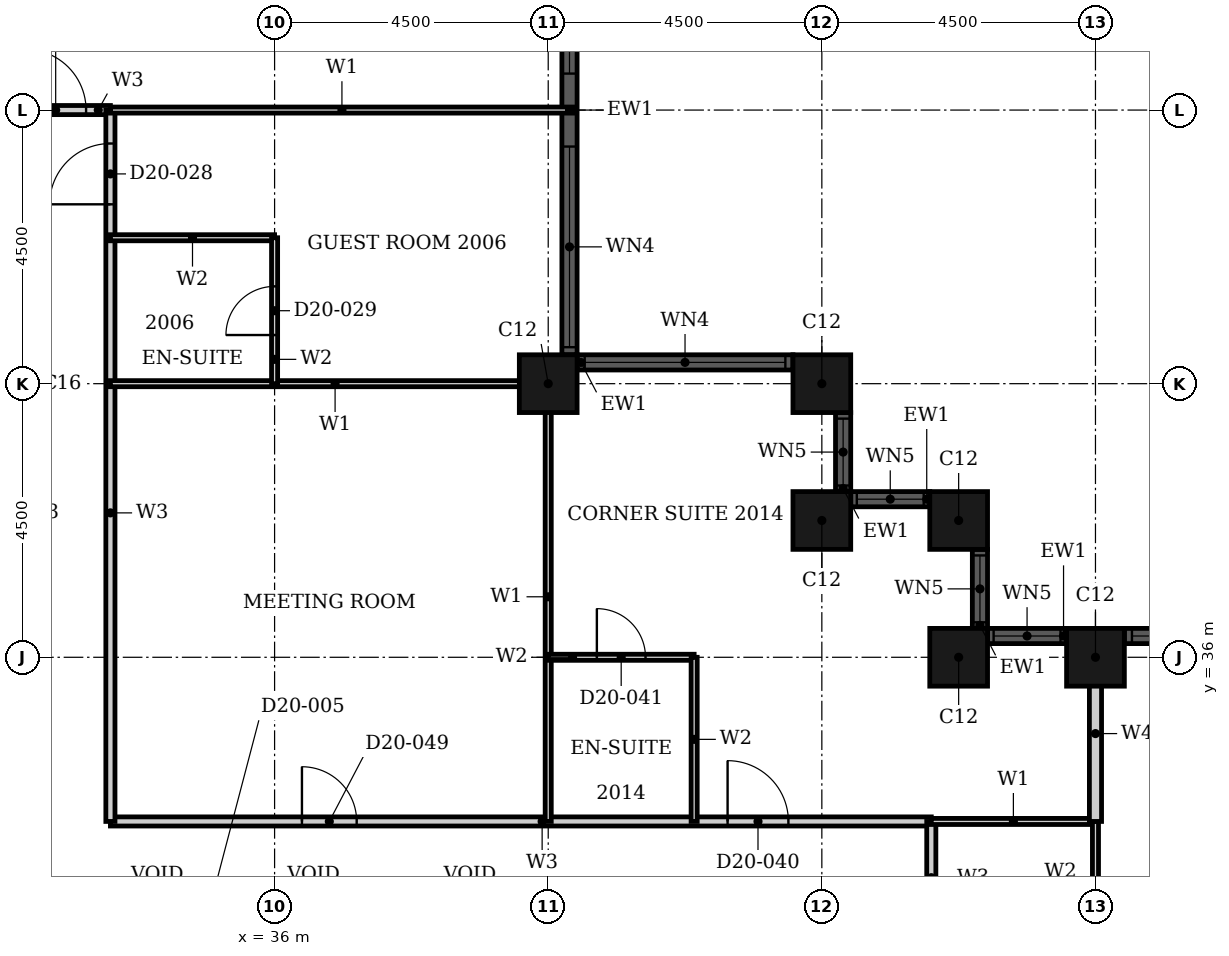
"""IFC4 building model, lengths in metres.
Left out: names, types, materials, properties, quantities, classifications, styles, units other than length and angle.
Written with IfcOpenShell. Run it as: python <this file> out.ifc"""

import sys

from ifc_helpers import new_model, si_unit, direction, frame, frame_2d, origin, origin_2d, place, context, subcontext, project, spatial, rectangle, hollow_rectangle, extrude, element, fill, save


model = new_model("IFC4")
c1 = context("Model", 3, precision=1e-05, world=origin(), true_north=direction((0.0, 1.0)))
c2 = subcontext(c1, "Body", "Model", "MODEL_VIEW")
j1 = project(units=[si_unit("LENGTHUNIT", "METRE"), si_unit("PLANEANGLEUNIT", "RADIAN")], contexts=[c1])
p1 = place(None, origin())
s1 = spatial("IfcSite", under=j1, at=p1, CompositionType="ELEMENT")
p2 = place(p1, origin())
s2 = spatial("IfcBuilding", under=s1, at=p2, CompositionType="ELEMENT")
p3 = place(p2, frame((0.0, 0.0, 85.2)))
s3 = spatial("IfcBuildingStorey", under=s2, at=p3, CompositionType="ELEMENT", Elevation=85.2)
for number, where, z_axis, x_axis in (
    (1, (49.5, 36.0, 0.0), (0.0, 0.0, 1.0), (1.0, 0.0, 0.0)),
    (2, (47.25, 36.0, 0.0), (0.0, 0.0, 1.0), (1.0, 0.0, 0.0)),
    (3, (47.25, 38.25, 0.0), (0.0, 0.0, 1.0), (1.0, 0.0, 0.0)),
    (4, (45.0, 38.25, 0.0), (0.0, 0.0, 1.0), (1.0, 0.0, 0.0)),
    (5, (45.0, 40.5, 0.0), (0.0, 0.0, 1.0), (1.0, 0.0, 0.0)),
    (6, (40.5, 40.5, 0.0), (0.0, 0.0, 1.0), (1.0, 0.0, 0.0)),
):
    element("IfcColumn", number, at=place(p3, frame(where, z_axis=z_axis, x_axis=x_axis)), inside=s3, PredefinedType="COLUMN", context=c2, shape_type="SweptSolid", body=[
        extrude(hollow_rectangle(XDim=0.95, YDim=0.95, WallThickness=0.03, at=origin_2d()), origin(), (0.0, 0.0, 1.0), 3.6),
    ])
p4 = place(p3, frame((58.025, 36.35, 0.0), z_axis=(0.0, 0.0, 1.0), x_axis=(-1.0, 0.0, 0.0)))
e7 = element("IfcWall", 7, at=p4, inside=s3, PredefinedType="SOLIDWALL", context=c2, shape_type="SweptSolid", body=[
    extrude(rectangle(XDim=8.05, YDim=0.25, at=frame_2d((4.025, 0.0))), origin(), (0.0, 0.0, 1.0), 3.6),
])
p5 = place(p4, frame((0.125, 0.0, 0.9)))
e8 = element("IfcOpeningElement", 8, at=p5, cuts=e7, PredefinedType="OPENING", context=c2, shape_type="SweptSolid", body=[
    extrude(rectangle(XDim=3.3, YDim=2.08, at=frame_2d((1.65, 1.04))), frame((0.0, 0.135, 0.0), z_axis=(0.0, -1.0, 0.0), x_axis=(1.0, 0.0, 0.0)), (0.0, 0.0, 1.0), 0.27),
])
p6 = place(p4, frame((4.625, 0.0, 0.9)))
e9 = element("IfcOpeningElement", 9, at=p6, cuts=e7, PredefinedType="OPENING", context=c2, shape_type="SweptSolid", body=[
    extrude(rectangle(XDim=3.3, YDim=2.08, at=frame_2d((1.65, 1.04))), frame((0.0, 0.135, 0.0), z_axis=(0.0, -1.0, 0.0), x_axis=(1.0, 0.0, 0.0)), (0.0, 0.0, 1.0), 0.27),
])
p7 = place(p3, frame((49.025, 36.35, 0.0), z_axis=(0.0, 0.0, 1.0), x_axis=(-1.0, 0.0, 0.0)))
e10 = element("IfcWall", 10, at=p7, inside=s3, PredefinedType="SOLIDWALL", context=c2, shape_type="SweptSolid", body=[
    extrude(rectangle(XDim=1.3, YDim=0.25, at=frame_2d((0.65, 0.0))), origin(), (0.0, 0.0, 1.0), 3.6),
])
p8 = place(p7, frame((0.1, 0.0, 0.9)))
e11 = element("IfcOpeningElement", 11, at=p8, cuts=e10, PredefinedType="OPENING", context=c2, shape_type="SweptSolid", body=[
    extrude(rectangle(XDim=1.1, YDim=2.08, at=frame_2d((0.55, 1.04))), frame((0.0, 0.135, 0.0), z_axis=(0.0, -1.0, 0.0), x_axis=(1.0, 0.0, 0.0)), (0.0, 0.0, 1.0), 0.27),
])
p9 = place(p3, frame((47.6, 36.475, 0.0), z_axis=(0.0, 0.0, 1.0), x_axis=(0.0, 1.0, 0.0)))
e12 = element("IfcWall", 12, at=p9, inside=s3, PredefinedType="SOLIDWALL", context=c2, shape_type="SweptSolid", body=[
    extrude(rectangle(XDim=1.3, YDim=0.25, at=frame_2d((0.65, 0.0))), origin(), (0.0, 0.0, 1.0), 3.6),
])
p10 = place(p9, frame((0.1, 0.0, 0.9)))
e13 = element("IfcOpeningElement", 13, at=p10, cuts=e12, PredefinedType="OPENING", context=c2, shape_type="SweptSolid", body=[
    extrude(rectangle(XDim=1.1, YDim=2.08, at=frame_2d((0.55, 1.04))), frame((0.0, 0.135, 0.0), z_axis=(0.0, -1.0, 0.0), x_axis=(1.0, 0.0, 0.0)), (0.0, 0.0, 1.0), 0.27),
])
p11 = place(p3, frame((46.775, 38.6, 0.0), z_axis=(0.0, 0.0, 1.0), x_axis=(-1.0, 0.0, 0.0)))
e14 = element("IfcWall", 14, at=p11, inside=s3, PredefinedType="SOLIDWALL", context=c2, shape_type="SweptSolid", body=[
    extrude(rectangle(XDim=1.3, YDim=0.25, at=frame_2d((0.65, 0.0))), origin(), (0.0, 0.0, 1.0), 3.6),
])
p12 = place(p11, frame((0.1, 0.0, 0.9)))
e15 = element("IfcOpeningElement", 15, at=p12, cuts=e14, PredefinedType="OPENING", context=c2, shape_type="SweptSolid", body=[
    extrude(rectangle(XDim=1.1, YDim=2.08, at=frame_2d((0.55, 1.04))), frame((0.0, 0.135, 0.0), z_axis=(0.0, -1.0, 0.0), x_axis=(1.0, 0.0, 0.0)), (0.0, 0.0, 1.0), 0.27),
])
p13 = place(p3, frame((45.35, 38.725, 0.0), z_axis=(0.0, 0.0, 1.0), x_axis=(0.0, 1.0, 0.0)))
e16 = element("IfcWall", 16, at=p13, inside=s3, PredefinedType="SOLIDWALL", context=c2, shape_type="SweptSolid", body=[
    extrude(rectangle(XDim=1.3, YDim=0.25, at=frame_2d((0.65, 0.0))), origin(), (0.0, 0.0, 1.0), 3.6),
])
p14 = place(p13, frame((0.1, 0.0, 0.9)))
e17 = element("IfcOpeningElement", 17, at=p14, cuts=e16, PredefinedType="OPENING", context=c2, shape_type="SweptSolid", body=[
    extrude(rectangle(XDim=1.1, YDim=2.08, at=frame_2d((0.55, 1.04))), frame((0.0, 0.135, 0.0), z_axis=(0.0, -1.0, 0.0), x_axis=(1.0, 0.0, 0.0)), (0.0, 0.0, 1.0), 0.27),
])
p15 = place(p3, frame((44.525, 40.85, 0.0), z_axis=(0.0, 0.0, 1.0), x_axis=(-1.0, 0.0, 0.0)))
e18 = element("IfcWall", 18, at=p15, inside=s3, PredefinedType="SOLIDWALL", context=c2, shape_type="SweptSolid", body=[
    extrude(rectangle(XDim=3.55, YDim=0.25, at=frame_2d((1.775, 0.0))), origin(), (0.0, 0.0, 1.0), 3.6),
])
p16 = place(p15, frame((0.125, 0.0, 0.9)))
e19 = element("IfcOpeningElement", 19, at=p16, cuts=e18, PredefinedType="OPENING", context=c2, shape_type="SweptSolid", body=[
    extrude(rectangle(XDim=3.3, YDim=2.08, at=frame_2d((1.65, 1.04))), frame((0.0, 0.135, 0.0), z_axis=(0.0, -1.0, 0.0), x_axis=(1.0, 0.0, 0.0)), (0.0, 0.0, 1.0), 0.27),
])
p17 = place(p3, frame((40.85, 40.975, 0.0), z_axis=(0.0, 0.0, 1.0), x_axis=(0.0, 1.0, 0.0)))
e20 = element("IfcWall", 20, at=p17, inside=s3, PredefinedType="SOLIDWALL", context=c2, shape_type="SweptSolid", body=[
    extrude(rectangle(XDim=8.05, YDim=0.25, at=frame_2d((4.025, 0.0))), origin(), (0.0, 0.0, 1.0), 3.6),
])
p18 = place(p17, frame((0.125, 0.0, 0.9)))
e21 = element("IfcOpeningElement", 21, at=p18, cuts=e20, PredefinedType="OPENING", context=c2, shape_type="SweptSolid", body=[
    extrude(rectangle(XDim=3.3, YDim=2.08, at=frame_2d((1.65, 1.04))), frame((0.0, 0.135, 0.0), z_axis=(0.0, -1.0, 0.0), x_axis=(1.0, 0.0, 0.0)), (0.0, 0.0, 1.0), 0.27),
])
p19 = place(p17, frame((4.625, 0.0, 0.9)))
e22 = element("IfcOpeningElement", 22, at=p19, cuts=e20, PredefinedType="OPENING", context=c2, shape_type="SweptSolid", body=[
    extrude(rectangle(XDim=3.3, YDim=2.08, at=frame_2d((1.65, 1.04))), frame((0.0, 0.135, 0.0), z_axis=(0.0, -1.0, 0.0), x_axis=(1.0, 0.0, 0.0)), (0.0, 0.0, 1.0), 0.27),
])
p20 = place(p3, frame((33.3, 33.3, 0.0), z_axis=(0.0, 0.0, 1.0), x_axis=(1.0, 0.0, 0.0)))
e23 = element("IfcWall", 23, at=p20, inside=s3, PredefinedType="PARTITIONING", context=c2, shape_type="SweptSolid", body=[
    extrude(rectangle(XDim=13.5, YDim=0.15, at=frame_2d((6.75, 0.0))), origin(), (0.0, 0.0, 1.0), 3.3),
])
p21 = place(p20, frame((10.15, 0.0, 0.0)))
e24 = element("IfcOpeningElement", 24, at=p21, cuts=e23, PredefinedType="OPENING", context=c2, shape_type="SweptSolid", body=[
    extrude(rectangle(XDim=1.0, YDim=2.1, at=frame_2d((0.5, 1.05))), frame((0.0, 0.085, 0.0), z_axis=(0.0, -1.0, 0.0), x_axis=(1.0, 0.0, 0.0)), (0.0, 0.0, 1.0), 0.17),
])
p22 = place(p20, frame((3.15, 0.0, 0.0)))
e25 = element("IfcOpeningElement", 25, at=p22, cuts=e23, PredefinedType="OPENING", context=c2, shape_type="SweptSolid", body=[
    extrude(rectangle(XDim=0.9, YDim=2.1, at=frame_2d((0.45, 1.05))), frame((0.0, 0.085, 0.0), z_axis=(0.0, -1.0, 0.0), x_axis=(1.0, 0.0, 0.0)), (0.0, 0.0, 1.0), 0.17),
])
p23 = place(p3, frame((31.5, 45.0, 0.0), z_axis=(0.0, 0.0, 1.0), x_axis=(1.0, 0.0, 0.0)))
e26 = element("IfcWall", 26, at=p23, inside=s3, PredefinedType="PARTITIONING", context=c2, shape_type="SweptSolid", body=[
    extrude(rectangle(XDim=1.8, YDim=0.15, at=frame_2d((0.9, 0.0))), origin(), (0.0, 0.0, 1.0), 3.3),
])
p24 = place(p23, frame((0.4, 0.0, 0.0)))
e27 = element("IfcOpeningElement", 27, at=p24, cuts=e26, PredefinedType="OPENING", context=c2, shape_type="SweptSolid", body=[
    extrude(rectangle(XDim=1.0, YDim=2.1, at=frame_2d((0.5, 1.05))), frame((0.0, 0.085, 0.0), z_axis=(0.0, -1.0, 0.0), x_axis=(1.0, 0.0, 0.0)), (0.0, 0.0, 1.0), 0.17),
])
p25 = place(p3, frame((33.3, 33.3, 0.0), z_axis=(0.0, 0.0, 1.0), x_axis=(0.0, 1.0, 0.0)))
e28 = element("IfcWall", 28, at=p25, inside=s3, PredefinedType="PARTITIONING", context=c2, shape_type="SweptSolid", body=[
    extrude(rectangle(XDim=11.7, YDim=0.15, at=frame_2d((5.85, 0.0))), origin(), (0.0, 0.0, 1.0), 3.3),
])
p26 = place(p25, frame((10.15, 0.0, 0.0)))
e29 = element("IfcOpeningElement", 29, at=p26, cuts=e28, PredefinedType="OPENING", context=c2, shape_type="SweptSolid", body=[
    extrude(rectangle(XDim=1.0, YDim=2.1, at=frame_2d((0.5, 1.05))), frame((0.0, 0.085, 0.0), z_axis=(0.0, -1.0, 0.0), x_axis=(1.0, 0.0, 0.0)), (0.0, 0.0, 1.0), 0.17),
])
p27 = place(p3, frame((46.8, 28.8, 0.0), z_axis=(0.0, 0.0, 1.0), x_axis=(0.0, 1.0, 0.0)))
e30 = element("IfcWall", 30, at=p27, inside=s3, PredefinedType="PARTITIONING", context=c2, shape_type="SweptSolid", body=[
    extrude(rectangle(XDim=4.5, YDim=0.15, at=frame_2d((2.25, 0.0))), origin(), (0.0, 0.0, 1.0), 3.3),
])
p28 = place(p27, frame((1.75, 0.0, 0.0)))
e31 = element("IfcOpeningElement", 31, at=p28, cuts=e30, PredefinedType="OPENING", context=c2, shape_type="SweptSolid", body=[
    extrude(rectangle(XDim=0.9, YDim=2.1, at=frame_2d((0.45, 1.05))), frame((0.0, 0.085, 0.0), z_axis=(0.0, -1.0, 0.0), x_axis=(1.0, 0.0, 0.0)), (0.0, 0.0, 1.0), 0.17),
])
p29 = place(p3, frame((46.8, 33.3, 0.0), z_axis=(0.0, 0.0, 1.0), x_axis=(1.0, 0.0, 0.0)))
e32 = element("IfcWall", 32, at=p29, inside=s3, PredefinedType="PARTITIONING", context=c2, shape_type="SweptSolid", body=[
    extrude(rectangle(XDim=2.7, YDim=0.1, at=frame_2d((1.35, 0.0))), origin(), (0.0, 0.0, 1.0), 3.3),
])
p30 = place(p3, frame((33.3, 40.5, 0.0), z_axis=(0.0, 0.0, 1.0), x_axis=(1.0, 0.0, 0.0)))
e33 = element("IfcWall", 33, at=p30, inside=s3, PredefinedType="PARTITIONING", context=c2, shape_type="SweptSolid", body=[
    extrude(rectangle(XDim=7.39, YDim=0.1, at=frame_2d((3.695, 0.0))), origin(), (0.0, 0.0, 1.0), 2.38),
])
p31 = place(p3, frame((33.3, 45.0, 0.0), z_axis=(0.0, 0.0, 1.0), x_axis=(1.0, 0.0, 0.0)))
e34 = element("IfcWall", 34, at=p31, inside=s3, PredefinedType="PARTITIONING", context=c2, shape_type="SweptSolid", body=[
    extrude(rectangle(XDim=7.615, YDim=0.1, at=frame_2d((3.808, 0.0))), origin(), (0.0, 0.0, 1.0), 3.3),
])
p32 = place(p3, frame((40.5, 33.3, 0.0), z_axis=(0.0, 0.0, 1.0), x_axis=(0.0, 1.0, 0.0)))
e35 = element("IfcWall", 35, at=p32, inside=s3, PredefinedType="PARTITIONING", context=c2, shape_type="SweptSolid", body=[
    extrude(rectangle(XDim=7.39, YDim=0.1, at=frame_2d((3.695, 0.0))), origin(), (0.0, 0.0, 1.0), 3.3),
])
p33 = place(p3, frame((49.5, 28.8, 0.0), z_axis=(0.0, 0.0, 1.0), x_axis=(0.0, 1.0, 0.0)))
e36 = element("IfcWall", 36, at=p33, inside=s3, PredefinedType="PARTITIONING", context=c2, shape_type="SweptSolid", body=[
    extrude(rectangle(XDim=4.5, YDim=0.1, at=frame_2d((2.25, 0.0))), origin(), (0.0, 0.0, 1.0), 2.38),
])
p34 = place(p3, frame((49.5, 33.3, 0.0), z_axis=(0.0, 0.0, 1.0), x_axis=(0.0, 1.0, 0.0)))
e37 = element("IfcWall", 37, at=p34, inside=s3, PredefinedType="PARTITIONING", context=c2, shape_type="SweptSolid", body=[
    extrude(rectangle(XDim=2.89, YDim=0.2, at=frame_2d((1.445, 0.0))), origin(), (0.0, 0.0, 1.0), 2.38),
])
p35 = place(p3, frame((40.5, 36.0, 0.0), z_axis=(0.0, 0.0, 1.0), x_axis=(1.0, 0.0, 0.0)))
e38 = element("IfcWall", 38, at=p35, inside=s3, PredefinedType="PARTITIONING", context=c2, shape_type="SweptSolid", body=[
    extrude(rectangle(XDim=2.4, YDim=0.1, at=frame_2d((1.2, 0.0))), origin(), (0.0, 0.0, 1.0), 3.3),
])
p36 = place(p35, frame((0.8, 0.0, 0.0)))
e39 = element("IfcOpeningElement", 39, at=p36, cuts=e38, PredefinedType="OPENING", context=c2, shape_type="SweptSolid", body=[
    extrude(rectangle(XDim=0.8, YDim=2.1, at=frame_2d((0.4, 1.05))), frame((0.0, 0.06, 0.0), z_axis=(0.0, -1.0, 0.0), x_axis=(1.0, 0.0, 0.0)), (0.0, 0.0, 1.0), 0.12),
])
p37 = place(p3, frame((33.3, 42.9, 0.0), z_axis=(0.0, 0.0, 1.0), x_axis=(1.0, 0.0, 0.0)))
e40 = element("IfcWall", 40, at=p37, inside=s3, PredefinedType="PARTITIONING", context=c2, shape_type="SweptSolid", body=[
    extrude(rectangle(XDim=2.7, YDim=0.1, at=frame_2d((1.35, 0.0))), origin(), (0.0, 0.0, 1.0), 3.3),
])
p38 = place(p3, frame((36.0, 40.5, 0.0), z_axis=(0.0, 0.0, 1.0), x_axis=(0.0, 1.0, 0.0)))
e41 = element("IfcWall", 41, at=p38, inside=s3, PredefinedType="PARTITIONING", context=c2, shape_type="SweptSolid", body=[
    extrude(rectangle(XDim=2.4, YDim=0.1, at=frame_2d((1.2, 0.0))), origin(), (0.0, 0.0, 1.0), 2.58),
])
p39 = place(p38, frame((0.8, 0.0, 0.0)))
e42 = element("IfcOpeningElement", 42, at=p39, cuts=e41, PredefinedType="OPENING", context=c2, shape_type="SweptSolid", body=[
    extrude(rectangle(XDim=0.8, YDim=2.1, at=frame_2d((0.4, 1.05))), frame((0.0, 0.06, 0.0), z_axis=(0.0, -1.0, 0.0), x_axis=(1.0, 0.0, 0.0)), (0.0, 0.0, 1.0), 0.12),
])
p40 = place(p3, frame((42.9, 33.3, 0.0), z_axis=(0.0, 0.0, 1.0), x_axis=(0.0, 1.0, 0.0)))
e43 = element("IfcWall", 43, at=p40, inside=s3, PredefinedType="PARTITIONING", context=c2, shape_type="SweptSolid", body=[
    extrude(rectangle(XDim=2.7, YDim=0.1, at=frame_2d((1.35, 0.0))), origin(), (0.0, 0.0, 1.0), 3.3),
])
p41 = place(p6, origin())
e44 = element("IfcWindow", 44, at=p41, inside=s3, PartitioningType="SINGLE_PANEL", PredefinedType="WINDOW", context=c2, shape_type="SweptSolid", body=[
    extrude(rectangle(XDim=3.3, YDim=2.08, at=frame_2d((1.65, 1.04))), frame((0.0, 0.03, 0.0), z_axis=(0.0, -1.0, 0.0), x_axis=(1.0, 0.0, 0.0)), (0.0, 0.0, 1.0), 0.06),
])
fill(e9, e44)
p42 = place(p8, origin())
e45 = element("IfcWindow", 45, at=p42, inside=s3, PartitioningType="SINGLE_PANEL", PredefinedType="WINDOW", context=c2, shape_type="SweptSolid", body=[
    extrude(rectangle(XDim=1.1, YDim=2.08, at=frame_2d((0.55, 1.04))), frame((0.0, 0.03, 0.0), z_axis=(0.0, -1.0, 0.0), x_axis=(1.0, 0.0, 0.0)), (0.0, 0.0, 1.0), 0.06),
])
fill(e11, e45)
p43 = place(p10, origin())
e46 = element("IfcWindow", 46, at=p43, inside=s3, PartitioningType="SINGLE_PANEL", PredefinedType="WINDOW", context=c2, shape_type="SweptSolid", body=[
    extrude(rectangle(XDim=1.1, YDim=2.08, at=frame_2d((0.55, 1.04))), frame((0.0, 0.03, 0.0), z_axis=(0.0, -1.0, 0.0), x_axis=(1.0, 0.0, 0.0)), (0.0, 0.0, 1.0), 0.06),
])
fill(e13, e46)
p44 = place(p12, origin())
e47 = element("IfcWindow", 47, at=p44, inside=s3, PartitioningType="SINGLE_PANEL", PredefinedType="WINDOW", context=c2, shape_type="SweptSolid", body=[
    extrude(rectangle(XDim=1.1, YDim=2.08, at=frame_2d((0.55, 1.04))), frame((0.0, 0.03, 0.0), z_axis=(0.0, -1.0, 0.0), x_axis=(1.0, 0.0, 0.0)), (0.0, 0.0, 1.0), 0.06),
])
fill(e15, e47)
p45 = place(p14, origin())
e48 = element("IfcWindow", 48, at=p45, inside=s3, PartitioningType="SINGLE_PANEL", PredefinedType="WINDOW", context=c2, shape_type="SweptSolid", body=[
    extrude(rectangle(XDim=1.1, YDim=2.08, at=frame_2d((0.55, 1.04))), frame((0.0, 0.03, 0.0), z_axis=(0.0, -1.0, 0.0), x_axis=(1.0, 0.0, 0.0)), (0.0, 0.0, 1.0), 0.06),
])
fill(e17, e48)
p46 = place(p16, origin())
e49 = element("IfcWindow", 49, at=p46, inside=s3, PartitioningType="SINGLE_PANEL", PredefinedType="WINDOW", context=c2, shape_type="SweptSolid", body=[
    extrude(rectangle(XDim=3.3, YDim=2.08, at=frame_2d((1.65, 1.04))), frame((0.0, 0.03, 0.0), z_axis=(0.0, -1.0, 0.0), x_axis=(1.0, 0.0, 0.0)), (0.0, 0.0, 1.0), 0.06),
])
fill(e19, e49)
p47 = place(p18, origin())
e50 = element("IfcWindow", 50, at=p47, inside=s3, PartitioningType="SINGLE_PANEL", PredefinedType="WINDOW", context=c2, shape_type="SweptSolid", body=[
    extrude(rectangle(XDim=3.3, YDim=2.08, at=frame_2d((1.65, 1.04))), frame((0.0, 0.03, 0.0), z_axis=(0.0, -1.0, 0.0), x_axis=(1.0, 0.0, 0.0)), (0.0, 0.0, 1.0), 0.06),
])
fill(e21, e50)
p48 = place(p19, origin())
e51 = element("IfcWindow", 51, at=p48, inside=s3, PartitioningType="SINGLE_PANEL", PredefinedType="WINDOW", context=c2, shape_type="SweptSolid", body=[
    extrude(rectangle(XDim=3.3, YDim=2.08, at=frame_2d((1.65, 1.04))), frame((0.0, 0.03, 0.0), z_axis=(0.0, -1.0, 0.0), x_axis=(1.0, 0.0, 0.0)), (0.0, 0.0, 1.0), 0.06),
])
fill(e22, e51)
p49 = place(p26, origin())
e52 = element("IfcDoor", 52, at=p49, inside=s3, OperationType="SINGLE_SWING_RIGHT", PredefinedType="DOOR", context=c2, shape_type="SweptSolid", body=[
    extrude(rectangle(XDim=1.0, YDim=2.1, at=frame_2d((0.5, 1.05))), frame((0.0, 0.025, 0.0), z_axis=(0.0, -1.0, 0.0), x_axis=(1.0, 0.0, 0.0)), (0.0, 0.0, 1.0), 0.05),
])
fill(e29, e52)
p50 = place(p39, origin())
e53 = element("IfcDoor", 53, at=p50, inside=s3, OperationType="SINGLE_SWING_LEFT", PredefinedType="DOOR", context=c2, shape_type="SweptSolid", body=[
    extrude(rectangle(XDim=0.8, YDim=2.1, at=frame_2d((0.4, 1.05))), frame((0.0, 0.025, 0.0), z_axis=(0.0, -1.0, 0.0), x_axis=(1.0, 0.0, 0.0)), (0.0, 0.0, 1.0), 0.05),
])
fill(e42, e53)
p51 = place(p24, origin())
e54 = element("IfcDoor", 54, at=p51, inside=s3, OperationType="SINGLE_SWING_RIGHT", PredefinedType="DOOR", context=c2, shape_type="SweptSolid", body=[
    extrude(rectangle(XDim=1.0, YDim=2.1, at=frame_2d((0.5, 1.05))), frame((0.0, 0.025, 0.0), z_axis=(0.0, -1.0, 0.0), x_axis=(1.0, 0.0, 0.0)), (0.0, 0.0, 1.0), 0.05),
])
fill(e27, e54)
p52 = place(p21, origin())
e55 = element("IfcDoor", 55, at=p52, inside=s3, OperationType="SINGLE_SWING_RIGHT", PredefinedType="DOOR", context=c2, shape_type="SweptSolid", body=[
    extrude(rectangle(XDim=1.0, YDim=2.1, at=frame_2d((0.5, 1.05))), frame((0.0, 0.025, 0.0), z_axis=(0.0, -1.0, 0.0), x_axis=(1.0, 0.0, 0.0)), (0.0, 0.0, 1.0), 0.05),
])
fill(e24, e55)
p53 = place(p36, origin())
e56 = element("IfcDoor", 56, at=p53, inside=s3, OperationType="SINGLE_SWING_LEFT", PredefinedType="DOOR", context=c2, shape_type="SweptSolid", body=[
    extrude(rectangle(XDim=0.8, YDim=2.1, at=frame_2d((0.4, 1.05))), frame((0.0, 0.025, 0.0), z_axis=(0.0, -1.0, 0.0), x_axis=(1.0, 0.0, 0.0)), (0.0, 0.0, 1.0), 0.05),
])
fill(e39, e56)
p54 = place(p22, origin())
e57 = element("IfcDoor", 57, at=p54, inside=s3, OperationType="SINGLE_SWING_RIGHT", PredefinedType="DOOR", context=c2, shape_type="SweptSolid", body=[
    extrude(rectangle(XDim=0.9, YDim=2.1, at=frame_2d((0.45, 1.05))), frame((0.0, 0.025, 0.0), z_axis=(0.0, -1.0, 0.0), x_axis=(1.0, 0.0, 0.0)), (0.0, 0.0, 1.0), 0.05),
])
fill(e25, e57)
save(model, sys.argv[1])
